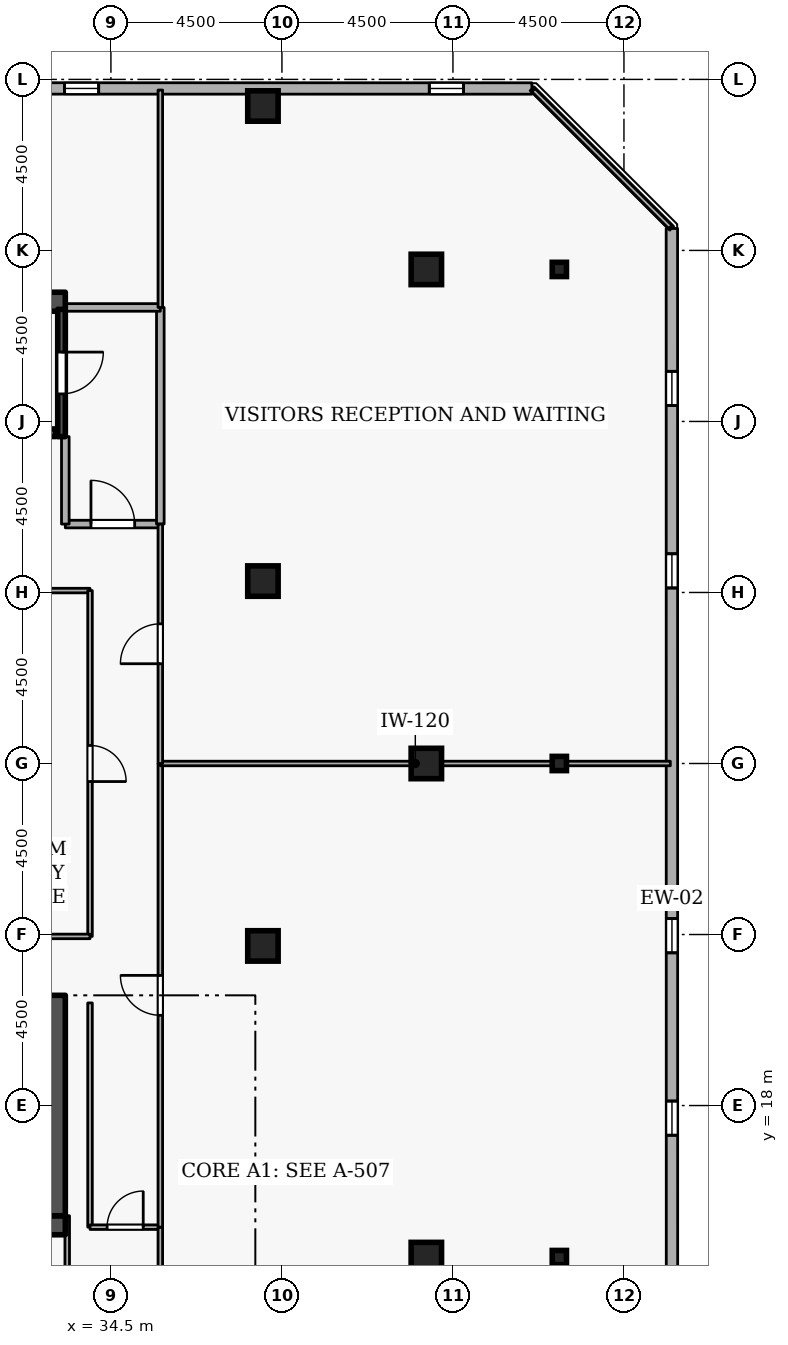
"""IFC4 building model, lengths in metres.
Left out: names, types, materials, properties, quantities, classifications, styles, units other than length and angle.
Written with IfcOpenShell. Run it as: python <this file> out.ifc"""

import sys

from ifc_helpers import new_model, si_unit, direction, frame, frame_2d, origin, origin_2d, place, context, subcontext, project, spatial, rectangle, i_section, extrude, element, fill, save


model = new_model("IFC4")
c1 = context("Model", 3, precision=1e-05, world=origin(), true_north=direction((0.0, 1.0)))
c2 = subcontext(c1, "Body", "Model", "MODEL_VIEW")
j1 = project(units=[si_unit("LENGTHUNIT", "METRE"), si_unit("PLANEANGLEUNIT", "RADIAN")], contexts=[c1])
p1 = place(None, origin())
s1 = spatial("IfcSite", under=j1, at=p1, CompositionType="ELEMENT")
p2 = place(p1, origin())
s2 = spatial("IfcBuilding", under=s1, at=p2, CompositionType="ELEMENT")
p3 = place(p2, frame((0.0, 0.0, 261.9)))
s3 = spatial("IfcBuildingStorey", under=s2, at=p3, CompositionType="ELEMENT", Elevation=261.9)
p4 = place(p3, frame((17.7, 14.85, 0.0), z_axis=(0.0, 0.0, 1.0), x_axis=(1.0, 0.0, 0.0)))
e1 = element("IfcWall", 1, at=p4, inside=s3, PredefinedType="SHEAR", context=c2, shape_type="SweptSolid", body=[
    extrude(rectangle(XDim=15.6, YDim=0.5, at=frame_2d((7.8, 0.0))), origin(), (0.0, 0.0, 1.0), 3.6),
])
p5 = place(p3, frame((33.05, 15.1, 0.0), z_axis=(0.0, 0.0, 1.0), x_axis=(0.0, 1.0, 0.0)))
e2 = element("IfcWall", 2, at=p5, inside=s3, PredefinedType="SHEAR", context=c2, shape_type="SweptSolid", body=[
    extrude(rectangle(XDim=5.8, YDim=0.5, at=frame_2d((2.9, 0.0))), origin(), (0.0, 0.0, 1.0), 3.6),
])
p6 = place(p3, frame((17.7, 39.15, 0.0), z_axis=(0.0, 0.0, 1.0), x_axis=(1.0, 0.0, 0.0)))
e3 = element("IfcWall", 3, at=p6, inside=s3, PredefinedType="SHEAR", context=c2, shape_type="SweptSolid", body=[
    extrude(rectangle(XDim=15.6, YDim=0.5, at=frame_2d((7.8, 0.0))), origin(), (0.0, 0.0, 1.0), 3.6),
])
for number, where, z_axis, x_axis in (
    (4, (42.8, 14.0, 0.0), (0.0, 0.0, 1.0), (1.0, 0.0, 0.0)),
    (5, (42.8, 27.0, 0.0), (0.0, 0.0, 1.0), (1.0, 0.0, 0.0)),
    (6, (42.8, 40.0, 0.0), (0.0, 0.0, 1.0), (1.0, 0.0, 0.0)),
    (7, (38.5, 44.3, 0.0), (0.0, 0.0, 1.0), (1.0, 0.0, 0.0)),
    (8, (38.5, 22.2, 0.0), (0.0, 0.0, 1.0), (1.0, 0.0, 0.0)),
    (9, (38.5, 31.8, 0.0), (0.0, 0.0, 1.0), (1.0, 0.0, 0.0)),
):
    element("IfcColumn", number, at=place(p3, frame(where, z_axis=z_axis, x_axis=x_axis)), inside=s3, PredefinedType="COLUMN", context=c2, shape_type="SweptSolid", body=[
        extrude(rectangle(XDim=0.8, YDim=0.8, at=origin_2d()), origin(), (0.0, 0.0, 1.0), 3.6),
    ])
for number, where, z_axis, x_axis in (
    (10, (46.3, 14.0, 0.0), (0.0, 0.0, 1.0), (1.0, 0.0, 0.0)),
    (11, (46.3, 27.0, 0.0), (0.0, 0.0, 1.0), (1.0, 0.0, 0.0)),
    (12, (46.3, 40.0, 0.0), (0.0, 0.0, 1.0), (1.0, 0.0, 0.0)),
):
    element("IfcColumn", number, at=place(p3, frame(where, z_axis=z_axis, x_axis=x_axis)), inside=s3, PredefinedType="COLUMN", context=c2, shape_type="SweptSolid", body=[
        extrude(i_section(OverallWidth=0.375, OverallDepth=0.375, WebThickness=0.017, FlangeThickness=0.027, FilletRadius=0.015, at=origin_2d()), origin(), (0.0, 0.0, 1.0), 3.6),
    ])
p7 = place(p3, frame((49.265, 5.819, 0.0), z_axis=(0.0, 0.0, 1.0), x_axis=(-0.000103863011, 0.999999994606, 0.0)))
e13 = element("IfcWall", 13, at=p7, inside=s3, PredefinedType="STANDARD", context=c2, shape_type="SweptSolid", body=[
    extrude(rectangle(XDim=35.259, YDim=0.3, at=frame_2d((17.629, 0.0))), origin(), (0.0, 0.0, 1.0), 2.7),
])
p8 = place(p7, frame((1.8, 0.0, 0.72)))
e14 = element("IfcOpeningElement", 14, at=p8, cuts=e13, PredefinedType="OPENING", context=c2, shape_type="SweptSolid", body=[
    extrude(rectangle(XDim=0.9, YDim=1.75, at=frame_2d((0.45, 0.875))), frame((0.0, 0.16, 0.0), z_axis=(0.0, -1.0, 0.0), x_axis=(1.0, 0.0, 0.0)), (0.0, 0.0, 1.0), 0.32),
])
p9 = place(p7, frame((6.6, 0.0, 0.72)))
e15 = element("IfcOpeningElement", 15, at=p9, cuts=e13, PredefinedType="OPENING", context=c2, shape_type="SweptSolid", body=[
    extrude(rectangle(XDim=0.9, YDim=1.75, at=frame_2d((0.45, 0.875))), frame((0.0, 0.16, 0.0), z_axis=(0.0, -1.0, 0.0), x_axis=(1.0, 0.0, 0.0)), (0.0, 0.0, 1.0), 0.32),
])
p10 = place(p7, frame((11.4, 0.0, 0.72)))
e16 = element("IfcOpeningElement", 16, at=p10, cuts=e13, PredefinedType="OPENING", context=c2, shape_type="SweptSolid", body=[
    extrude(rectangle(XDim=0.9, YDim=1.75, at=frame_2d((0.45, 0.875))), frame((0.0, 0.16, 0.0), z_axis=(0.0, -1.0, 0.0), x_axis=(1.0, 0.0, 0.0)), (0.0, 0.0, 1.0), 0.32),
])
p11 = place(p7, frame((16.2, 0.0, 0.72)))
e17 = element("IfcOpeningElement", 17, at=p11, cuts=e13, PredefinedType="OPENING", context=c2, shape_type="SweptSolid", body=[
    extrude(rectangle(XDim=0.9, YDim=1.75, at=frame_2d((0.45, 0.875))), frame((0.0, 0.16, 0.0), z_axis=(0.0, -1.0, 0.0), x_axis=(1.0, 0.0, 0.0)), (0.0, 0.0, 1.0), 0.32),
])
p12 = place(p7, frame((25.8, 0.0, 0.72)))
e18 = element("IfcOpeningElement", 18, at=p12, cuts=e13, PredefinedType="OPENING", context=c2, shape_type="SweptSolid", body=[
    extrude(rectangle(XDim=0.9, YDim=1.75, at=frame_2d((0.45, 0.875))), frame((0.0, 0.16, 0.0), z_axis=(0.0, -1.0, 0.0), x_axis=(1.0, 0.0, 0.0)), (0.0, 0.0, 1.0), 0.32),
])
p13 = place(p7, frame((30.6, 0.0, 0.72)))
e19 = element("IfcOpeningElement", 19, at=p13, cuts=e13, PredefinedType="OPENING", context=c2, shape_type="SweptSolid", body=[
    extrude(rectangle(XDim=0.9, YDim=1.75, at=frame_2d((0.45, 0.875))), frame((0.0, 0.16, 0.0), z_axis=(0.0, -1.0, 0.0), x_axis=(1.0, 0.0, 0.0)), (0.0, 0.0, 1.0), 0.32),
])
p14 = place(p3, frame((45.578, 44.761, 0.0), z_axis=(0.0, 0.0, 1.0), x_axis=(-0.999999994606, 0.000103863011, 0.0)))
e20 = element("IfcWall", 20, at=p14, inside=s3, PredefinedType="STANDARD", context=c2, shape_type="SweptSolid", body=[
    extrude(rectangle(XDim=35.259, YDim=0.3, at=frame_2d((17.629, 0.0))), origin(), (0.0, 0.0, 1.0), 2.7),
])
p15 = place(p14, frame((1.8, 0.0, 0.72)))
e21 = element("IfcOpeningElement", 21, at=p15, cuts=e20, PredefinedType="OPENING", context=c2, shape_type="SweptSolid", body=[
    extrude(rectangle(XDim=0.9, YDim=1.75, at=frame_2d((0.45, 0.875))), frame((0.0, 0.16, 0.0), z_axis=(0.0, -1.0, 0.0), x_axis=(1.0, 0.0, 0.0)), (0.0, 0.0, 1.0), 0.32),
])
p16 = place(p14, frame((11.4, 0.0, 0.72)))
e22 = element("IfcOpeningElement", 22, at=p16, cuts=e20, PredefinedType="OPENING", context=c2, shape_type="SweptSolid", body=[
    extrude(rectangle(XDim=0.9, YDim=1.75, at=frame_2d((0.45, 0.875))), frame((0.0, 0.16, 0.0), z_axis=(0.0, -1.0, 0.0), x_axis=(1.0, 0.0, 0.0)), (0.0, 0.0, 1.0), 0.32),
])
p17 = place(p14, frame((16.2, 0.0, 0.72)))
e23 = element("IfcOpeningElement", 23, at=p17, cuts=e20, PredefinedType="OPENING", context=c2, shape_type="SweptSolid", body=[
    extrude(rectangle(XDim=0.9, YDim=1.75, at=frame_2d((0.45, 0.875))), frame((0.0, 0.16, 0.0), z_axis=(0.0, -1.0, 0.0), x_axis=(1.0, 0.0, 0.0)), (0.0, 0.0, 1.0), 0.32),
])
p18 = place(p14, frame((25.8, 0.0, 0.72)))
e24 = element("IfcOpeningElement", 24, at=p18, cuts=e20, PredefinedType="OPENING", context=c2, shape_type="SweptSolid", body=[
    extrude(rectangle(XDim=0.9, YDim=1.75, at=frame_2d((0.45, 0.875))), frame((0.0, 0.16, 0.0), z_axis=(0.0, -1.0, 0.0), x_axis=(1.0, 0.0, 0.0)), (0.0, 0.0, 1.0), 0.32),
])
p19 = place(p14, frame((30.6, 0.0, 0.72)))
e25 = element("IfcOpeningElement", 25, at=p19, cuts=e20, PredefinedType="OPENING", context=c2, shape_type="SweptSolid", body=[
    extrude(rectangle(XDim=0.9, YDim=1.75, at=frame_2d((0.45, 0.875))), frame((0.0, 0.16, 0.0), z_axis=(0.0, -1.0, 0.0), x_axis=(1.0, 0.0, 0.0)), (0.0, 0.0, 1.0), 0.32),
])
p20 = place(p3, frame((33.2, 38.95, 0.0), z_axis=(0.0, 0.0, 1.0), x_axis=(0.0, -1.0, 0.0)))
e26 = element("IfcWall", 26, at=p20, inside=s3, PredefinedType="SHEAR", context=c2, shape_type="SweptSolid", body=[
    extrude(rectangle(XDim=3.35, YDim=0.2, at=frame_2d((1.675, 0.0))), origin(), (0.0, 0.0, 1.0), 3.6),
])
p21 = place(p20, frame((1.125, 0.0, 0.0)))
e27 = element("IfcOpeningElement", 27, at=p21, cuts=e26, PredefinedType="OPENING", context=c2, shape_type="SweptSolid", body=[
    extrude(rectangle(XDim=1.1, YDim=2.1, at=frame_2d((0.55, 1.05))), frame((0.0, 0.11, 0.0), z_axis=(0.0, -1.0, 0.0), x_axis=(1.0, 0.0, 0.0)), (0.0, 0.0, 1.0), 0.22),
])
p22 = place(p3, frame((25.95, 35.703, 0.0), z_axis=(0.0, 0.0, 1.0), x_axis=(1.0, 0.0, 0.0)))
e28 = element("IfcWall", 28, at=p22, inside=s3, PredefinedType="SHEAR", context=c2, shape_type="SweptSolid", body=[
    extrude(rectangle(XDim=7.1, YDim=0.2, at=frame_2d((3.55, 0.0))), origin(), (0.0, 0.0, 1.0), 3.6),
])
p23 = place(p3, frame((33.3, 33.3, 0.0), z_axis=(0.0, 0.0, 1.0), x_axis=(1.0, 0.0, 0.0)))
e29 = element("IfcWall", 29, at=p23, inside=s3, PredefinedType="STANDARD", context=c2, shape_type="SweptSolid", body=[
    extrude(rectangle(XDim=2.5, YDim=0.2, at=frame_2d((1.25, 0.0))), origin(), (0.0, 0.0, 1.0), 3.34),
])
p24 = place(p23, frame((0.675, 0.0, 0.0)))
e30 = element("IfcOpeningElement", 30, at=p24, cuts=e29, PredefinedType="OPENING", context=c2, shape_type="SweptSolid", body=[
    extrude(rectangle(XDim=1.15, YDim=2.1, at=frame_2d((0.575, 1.05))), frame((0.0, 0.11, 0.0), z_axis=(0.0, -1.0, 0.0), x_axis=(1.0, 0.0, 0.0)), (0.0, 0.0, 1.0), 0.22),
])
p25 = place(p3, frame((35.8, 33.3, 0.0), z_axis=(0.0, 0.0, 1.0), x_axis=(0.0, 1.0, 0.0)))
e31 = element("IfcWall", 31, at=p25, inside=s3, PredefinedType="STANDARD", context=c2, shape_type="SweptSolid", body=[
    extrude(rectangle(XDim=5.7, YDim=0.2, at=frame_2d((2.85, 0.0))), origin(), (0.0, 0.0, 1.0), 3.34),
])
p26 = place(p3, frame((35.8, 39.0, 0.0), z_axis=(0.0, 0.0, 1.0), x_axis=(-1.0, 0.0, 0.0)))
e32 = element("IfcWall", 32, at=p26, inside=s3, PredefinedType="STANDARD", context=c2, shape_type="SweptSolid", body=[
    extrude(rectangle(XDim=2.5, YDim=0.2, at=frame_2d((1.25, 0.0))), origin(), (0.0, 0.0, 1.0), 3.34),
])
p27 = place(p3, frame((33.3, 35.6, 0.0), z_axis=(0.0, 0.0, 1.0), x_axis=(0.0, -1.0, 0.0)))
e33 = element("IfcWall", 33, at=p27, inside=s3, PredefinedType="STANDARD", context=c2, shape_type="SweptSolid", body=[
    extrude(rectangle(XDim=2.3, YDim=0.2, at=frame_2d((1.15, 0.0))), origin(), (0.0, 0.0, 1.0), 2.545),
])
p28 = place(p3, frame((33.95, 20.7, 0.0), z_axis=(0.0, 0.0, 1.0), x_axis=(0.0, -1.0, 0.0)))
e34 = element("IfcWall", 34, at=p28, inside=s3, PredefinedType="PARTITIONING", context=c2, shape_type="SweptSolid", body=[
    extrude(rectangle(XDim=5.9, YDim=0.12, at=frame_2d((2.95, 0.0))), origin(), (0.0, 0.0, 1.0), 3.34),
])
p29 = place(p3, frame((33.95, 14.8, 0.0), z_axis=(0.0, 0.0, 1.0), x_axis=(1.0, 0.0, 0.0)))
e35 = element("IfcWall", 35, at=p29, inside=s3, PredefinedType="PARTITIONING", context=c2, shape_type="SweptSolid", body=[
    extrude(rectangle(XDim=1.85, YDim=0.12, at=frame_2d((0.925, 0.0))), origin(), (0.0, 0.0, 1.0), 3.34),
])
p30 = place(p29, frame((0.45, 0.0, 0.0)))
e36 = element("IfcOpeningElement", 36, at=p30, cuts=e35, PredefinedType="OPENING", context=c2, shape_type="SweptSolid", body=[
    extrude(rectangle(XDim=0.95, YDim=2.1, at=frame_2d((0.475, 1.05))), frame((0.0, 0.07, 0.0), z_axis=(0.0, -1.0, 0.0), x_axis=(1.0, 0.0, 0.0)), (0.0, 0.0, 1.0), 0.14),
])
p31 = place(p3, frame((35.8, 14.8, 0.0), z_axis=(0.0, 0.0, 1.0), x_axis=(0.0, -1.0, 0.0)))
e37 = element("IfcWall", 37, at=p31, inside=s3, PredefinedType="PARTITIONING", context=c2, shape_type="SweptSolid", body=[
    extrude(rectangle(XDim=11.52, YDim=0.12, at=frame_2d((5.76, 0.0))), origin(), (0.0, 0.0, 1.0), 3.34),
])
p32 = place(p3, frame((33.35, 3.28, 0.0), z_axis=(0.0, 0.0, 1.0), x_axis=(0.0, 1.0, 0.0)))
e38 = element("IfcWall", 38, at=p32, inside=s3, PredefinedType="PARTITIONING", context=c2, shape_type="SweptSolid", body=[
    extrude(rectangle(XDim=11.82, YDim=0.12, at=frame_2d((5.91, 0.0))), origin(), (0.0, 0.0, 1.0), 2.545),
])
p33 = place(p3, frame((35.8, 14.8, 0.0), z_axis=(0.0, 0.0, 1.0), x_axis=(0.0, 1.0, 0.0)))
e39 = element("IfcWall", 39, at=p33, inside=s3, PredefinedType="PARTITIONING", context=c2, shape_type="SweptSolid", body=[
    extrude(rectangle(XDim=12.2, YDim=0.12, at=frame_2d((6.1, 0.0))), origin(), (0.0, 0.0, 1.0), 3.34),
])
p34 = place(p33, frame((5.575, 0.0, 0.0)))
e40 = element("IfcOpeningElement", 40, at=p34, cuts=e39, PredefinedType="OPENING", context=c2, shape_type="SweptSolid", body=[
    extrude(rectangle(XDim=1.05, YDim=2.1, at=frame_2d((0.525, 1.05))), frame((0.0, 0.07, 0.0), z_axis=(0.0, -1.0, 0.0), x_axis=(1.0, 0.0, 0.0)), (0.0, 0.0, 1.0), 0.14),
])
p35 = place(p3, frame((35.8, 27.0, 0.0), z_axis=(0.0, 0.0, 1.0), x_axis=(1.0, 0.0, 0.0)))
e41 = element("IfcWall", 41, at=p35, inside=s3, PredefinedType="PARTITIONING", context=c2, shape_type="SweptSolid", body=[
    extrude(rectangle(XDim=13.42, YDim=0.12, at=frame_2d((6.71, 0.0))), origin(), (0.0, 0.0, 1.0), 2.932),
])
p36 = place(p3, frame((35.8, 39.0, 0.0), z_axis=(0.0, 0.0, 1.0), x_axis=(0.0, 1.0, 0.0)))
e42 = element("IfcWall", 42, at=p36, inside=s3, PredefinedType="PARTITIONING", context=c2, shape_type="SweptSolid", body=[
    extrude(rectangle(XDim=5.72, YDim=0.12, at=frame_2d((2.86, 0.0))), origin(), (0.0, 0.0, 1.0), 3.34),
])
p37 = place(p3, frame((45.617, 44.72, 0.0), z_axis=(0.0, 0.0, 1.0), x_axis=(0.707106781187, -0.707106781187, 0.0)))
e43 = element("IfcWall", 43, at=p37, inside=s3, PredefinedType="PARTITIONING", context=c2, shape_type="SweptSolid", body=[
    extrude(rectangle(XDim=5.095, YDim=0.12, at=frame_2d((2.547, 0.0))), origin(), (0.0, 0.0, 1.0), 3.34),
])
p38 = place(p3, frame((35.8, 27.0, 0.0), z_axis=(0.0, 0.0, 1.0), x_axis=(0.0, 1.0, 0.0)))
e44 = element("IfcWall", 44, at=p38, inside=s3, PredefinedType="PARTITIONING", context=c2, shape_type="SweptSolid", body=[
    extrude(rectangle(XDim=6.3, YDim=0.12, at=frame_2d((3.15, 0.0))), origin(), (0.0, 0.0, 1.0), 3.34),
])
p39 = place(p38, frame((2.625, 0.0, 0.0)))
e45 = element("IfcOpeningElement", 45, at=p39, cuts=e44, PredefinedType="OPENING", context=c2, shape_type="SweptSolid", body=[
    extrude(rectangle(XDim=1.05, YDim=2.1, at=frame_2d((0.525, 1.05))), frame((0.0, 0.07, 0.0), z_axis=(0.0, -1.0, 0.0), x_axis=(1.0, 0.0, 0.0)), (0.0, 0.0, 1.0), 0.14),
])
p40 = place(p3, frame((30.7, 31.55, 0.0), z_axis=(0.0, 0.0, 1.0), x_axis=(1.0, 0.0, 0.0)))
e46 = element("IfcWall", 46, at=p40, inside=s3, PredefinedType="PARTITIONING", context=c2, shape_type="SweptSolid", body=[
    extrude(rectangle(XDim=3.25, YDim=0.12, at=frame_2d((1.625, 0.0))), origin(), (0.0, 0.0, 1.0), 3.34),
])
p41 = place(p3, frame((33.95, 31.55, 0.0), z_axis=(0.0, 0.0, 1.0), x_axis=(0.0, -1.0, 0.0)))
e47 = element("IfcWall", 47, at=p41, inside=s3, PredefinedType="PARTITIONING", context=c2, shape_type="SweptSolid", body=[
    extrude(rectangle(XDim=9.1, YDim=0.12, at=frame_2d((4.55, 0.0))), origin(), (0.0, 0.0, 1.0), 3.34),
])
p42 = place(p41, frame((4.075, 0.0, 0.0)))
e48 = element("IfcOpeningElement", 48, at=p42, cuts=e47, PredefinedType="OPENING", context=c2, shape_type="SweptSolid", body=[
    extrude(rectangle(XDim=0.95, YDim=2.1, at=frame_2d((0.475, 1.05))), frame((0.0, 0.07, 0.0), z_axis=(0.0, -1.0, 0.0), x_axis=(1.0, 0.0, 0.0)), (0.0, 0.0, 1.0), 0.14),
])
p43 = place(p3, frame((33.95, 22.45, 0.0), z_axis=(0.0, 0.0, 1.0), x_axis=(-1.0, 0.0, 0.0)))
e49 = element("IfcWall", 49, at=p43, inside=s3, PredefinedType="PARTITIONING", context=c2, shape_type="SweptSolid", body=[
    extrude(rectangle(XDim=3.25, YDim=0.12, at=frame_2d((1.625, 0.0))), origin(), (0.0, 0.0, 1.0), 3.34),
])
p44 = place(p10, origin())
e50 = element("IfcWindow", 50, at=p44, inside=s3, PartitioningType="SINGLE_PANEL", PredefinedType="WINDOW", context=c2, shape_type="SweptSolid", body=[
    extrude(rectangle(XDim=0.9, YDim=1.75, at=frame_2d((0.45, 0.875))), frame((0.0, 0.03, 0.0), z_axis=(0.0, -1.0, 0.0), x_axis=(1.0, 0.0, 0.0)), (0.0, 0.0, 1.0), 0.06),
])
fill(e16, e50)
p45 = place(p11, origin())
e51 = element("IfcWindow", 51, at=p45, inside=s3, PartitioningType="SINGLE_PANEL", PredefinedType="WINDOW", context=c2, shape_type="SweptSolid", body=[
    extrude(rectangle(XDim=0.9, YDim=1.75, at=frame_2d((0.45, 0.875))), frame((0.0, 0.03, 0.0), z_axis=(0.0, -1.0, 0.0), x_axis=(1.0, 0.0, 0.0)), (0.0, 0.0, 1.0), 0.06),
])
fill(e17, e51)
p46 = place(p12, origin())
e52 = element("IfcWindow", 52, at=p46, inside=s3, PartitioningType="SINGLE_PANEL", PredefinedType="WINDOW", context=c2, shape_type="SweptSolid", body=[
    extrude(rectangle(XDim=0.9, YDim=1.75, at=frame_2d((0.45, 0.875))), frame((0.0, 0.03, 0.0), z_axis=(0.0, -1.0, 0.0), x_axis=(1.0, 0.0, 0.0)), (0.0, 0.0, 1.0), 0.06),
])
fill(e18, e52)
p47 = place(p13, origin())
e53 = element("IfcWindow", 53, at=p47, inside=s3, PartitioningType="SINGLE_PANEL", PredefinedType="WINDOW", context=c2, shape_type="SweptSolid", body=[
    extrude(rectangle(XDim=0.9, YDim=1.75, at=frame_2d((0.45, 0.875))), frame((0.0, 0.03, 0.0), z_axis=(0.0, -1.0, 0.0), x_axis=(1.0, 0.0, 0.0)), (0.0, 0.0, 1.0), 0.06),
])
fill(e19, e53)
p48 = place(p15, origin())
e54 = element("IfcWindow", 54, at=p48, inside=s3, PartitioningType="SINGLE_PANEL", PredefinedType="WINDOW", context=c2, shape_type="SweptSolid", body=[
    extrude(rectangle(XDim=0.9, YDim=1.75, at=frame_2d((0.45, 0.875))), frame((0.0, 0.03, 0.0), z_axis=(0.0, -1.0, 0.0), x_axis=(1.0, 0.0, 0.0)), (0.0, 0.0, 1.0), 0.06),
])
fill(e21, e54)
p49 = place(p16, origin())
e55 = element("IfcWindow", 55, at=p49, inside=s3, PartitioningType="SINGLE_PANEL", PredefinedType="WINDOW", context=c2, shape_type="SweptSolid", body=[
    extrude(rectangle(XDim=0.9, YDim=1.75, at=frame_2d((0.45, 0.875))), frame((0.0, 0.03, 0.0), z_axis=(0.0, -1.0, 0.0), x_axis=(1.0, 0.0, 0.0)), (0.0, 0.0, 1.0), 0.06),
])
fill(e22, e55)
p50 = place(p21, origin())
e56 = element("IfcDoor", 56, at=p50, inside=s3, OperationType="SINGLE_SWING_LEFT", PredefinedType="DOOR", context=c2, shape_type="SweptSolid", body=[
    extrude(rectangle(XDim=1.1, YDim=2.1, at=frame_2d((0.55, 1.05))), frame((0.0, 0.025, 0.0), z_axis=(0.0, -1.0, 0.0), x_axis=(1.0, 0.0, 0.0)), (0.0, 0.0, 1.0), 0.05),
])
fill(e27, e56)
p51 = place(p24, origin())
e57 = element("IfcDoor", 57, at=p51, inside=s3, OperationType="SINGLE_SWING_LEFT", PredefinedType="DOOR", context=c2, shape_type="SweptSolid", body=[
    extrude(rectangle(XDim=1.15, YDim=2.1, at=frame_2d((0.575, 1.05))), frame((0.0, 0.025, 0.0), z_axis=(0.0, -1.0, 0.0), x_axis=(1.0, 0.0, 0.0)), (0.0, 0.0, 1.0), 0.05),
])
fill(e30, e57)
p52 = place(p30, origin())
e58 = element("IfcDoor", 58, at=p52, inside=s3, OperationType="SINGLE_SWING_RIGHT", PredefinedType="DOOR", context=c2, shape_type="SweptSolid", body=[
    extrude(rectangle(XDim=0.95, YDim=2.1, at=frame_2d((0.475, 1.05))), frame((0.0, 0.025, 0.0), z_axis=(0.0, -1.0, 0.0), x_axis=(1.0, 0.0, 0.0)), (0.0, 0.0, 1.0), 0.05),
])
fill(e36, e58)
p53 = place(p34, origin())
e59 = element("IfcDoor", 59, at=p53, inside=s3, OperationType="SINGLE_SWING_RIGHT", PredefinedType="DOOR", context=c2, shape_type="SweptSolid", body=[
    extrude(rectangle(XDim=1.05, YDim=2.1, at=frame_2d((0.525, 1.05))), frame((0.0, 0.025, 0.0), z_axis=(0.0, -1.0, 0.0), x_axis=(1.0, 0.0, 0.0)), (0.0, 0.0, 1.0), 0.05),
])
fill(e40, e59)
p54 = place(p39, origin())
e60 = element("IfcDoor", 60, at=p54, inside=s3, OperationType="SINGLE_SWING_LEFT", PredefinedType="DOOR", context=c2, shape_type="SweptSolid", body=[
    extrude(rectangle(XDim=1.05, YDim=2.1, at=frame_2d((0.525, 1.05))), frame((0.0, 0.025, 0.0), z_axis=(0.0, -1.0, 0.0), x_axis=(1.0, 0.0, 0.0)), (0.0, 0.0, 1.0), 0.05),
])
fill(e45, e60)
p55 = place(p42, origin())
e61 = element("IfcDoor", 61, at=p55, inside=s3, OperationType="SINGLE_SWING_RIGHT", PredefinedType="DOOR", context=c2, shape_type="SweptSolid", body=[
    extrude(rectangle(XDim=0.95, YDim=2.1, at=frame_2d((0.475, 1.05))), frame((0.0, 0.025, 0.0), z_axis=(0.0, -1.0, 0.0), x_axis=(1.0, 0.0, 0.0)), (0.0, 0.0, 1.0), 0.05),
])
fill(e48, e61)
save(model, sys.argv[1])
